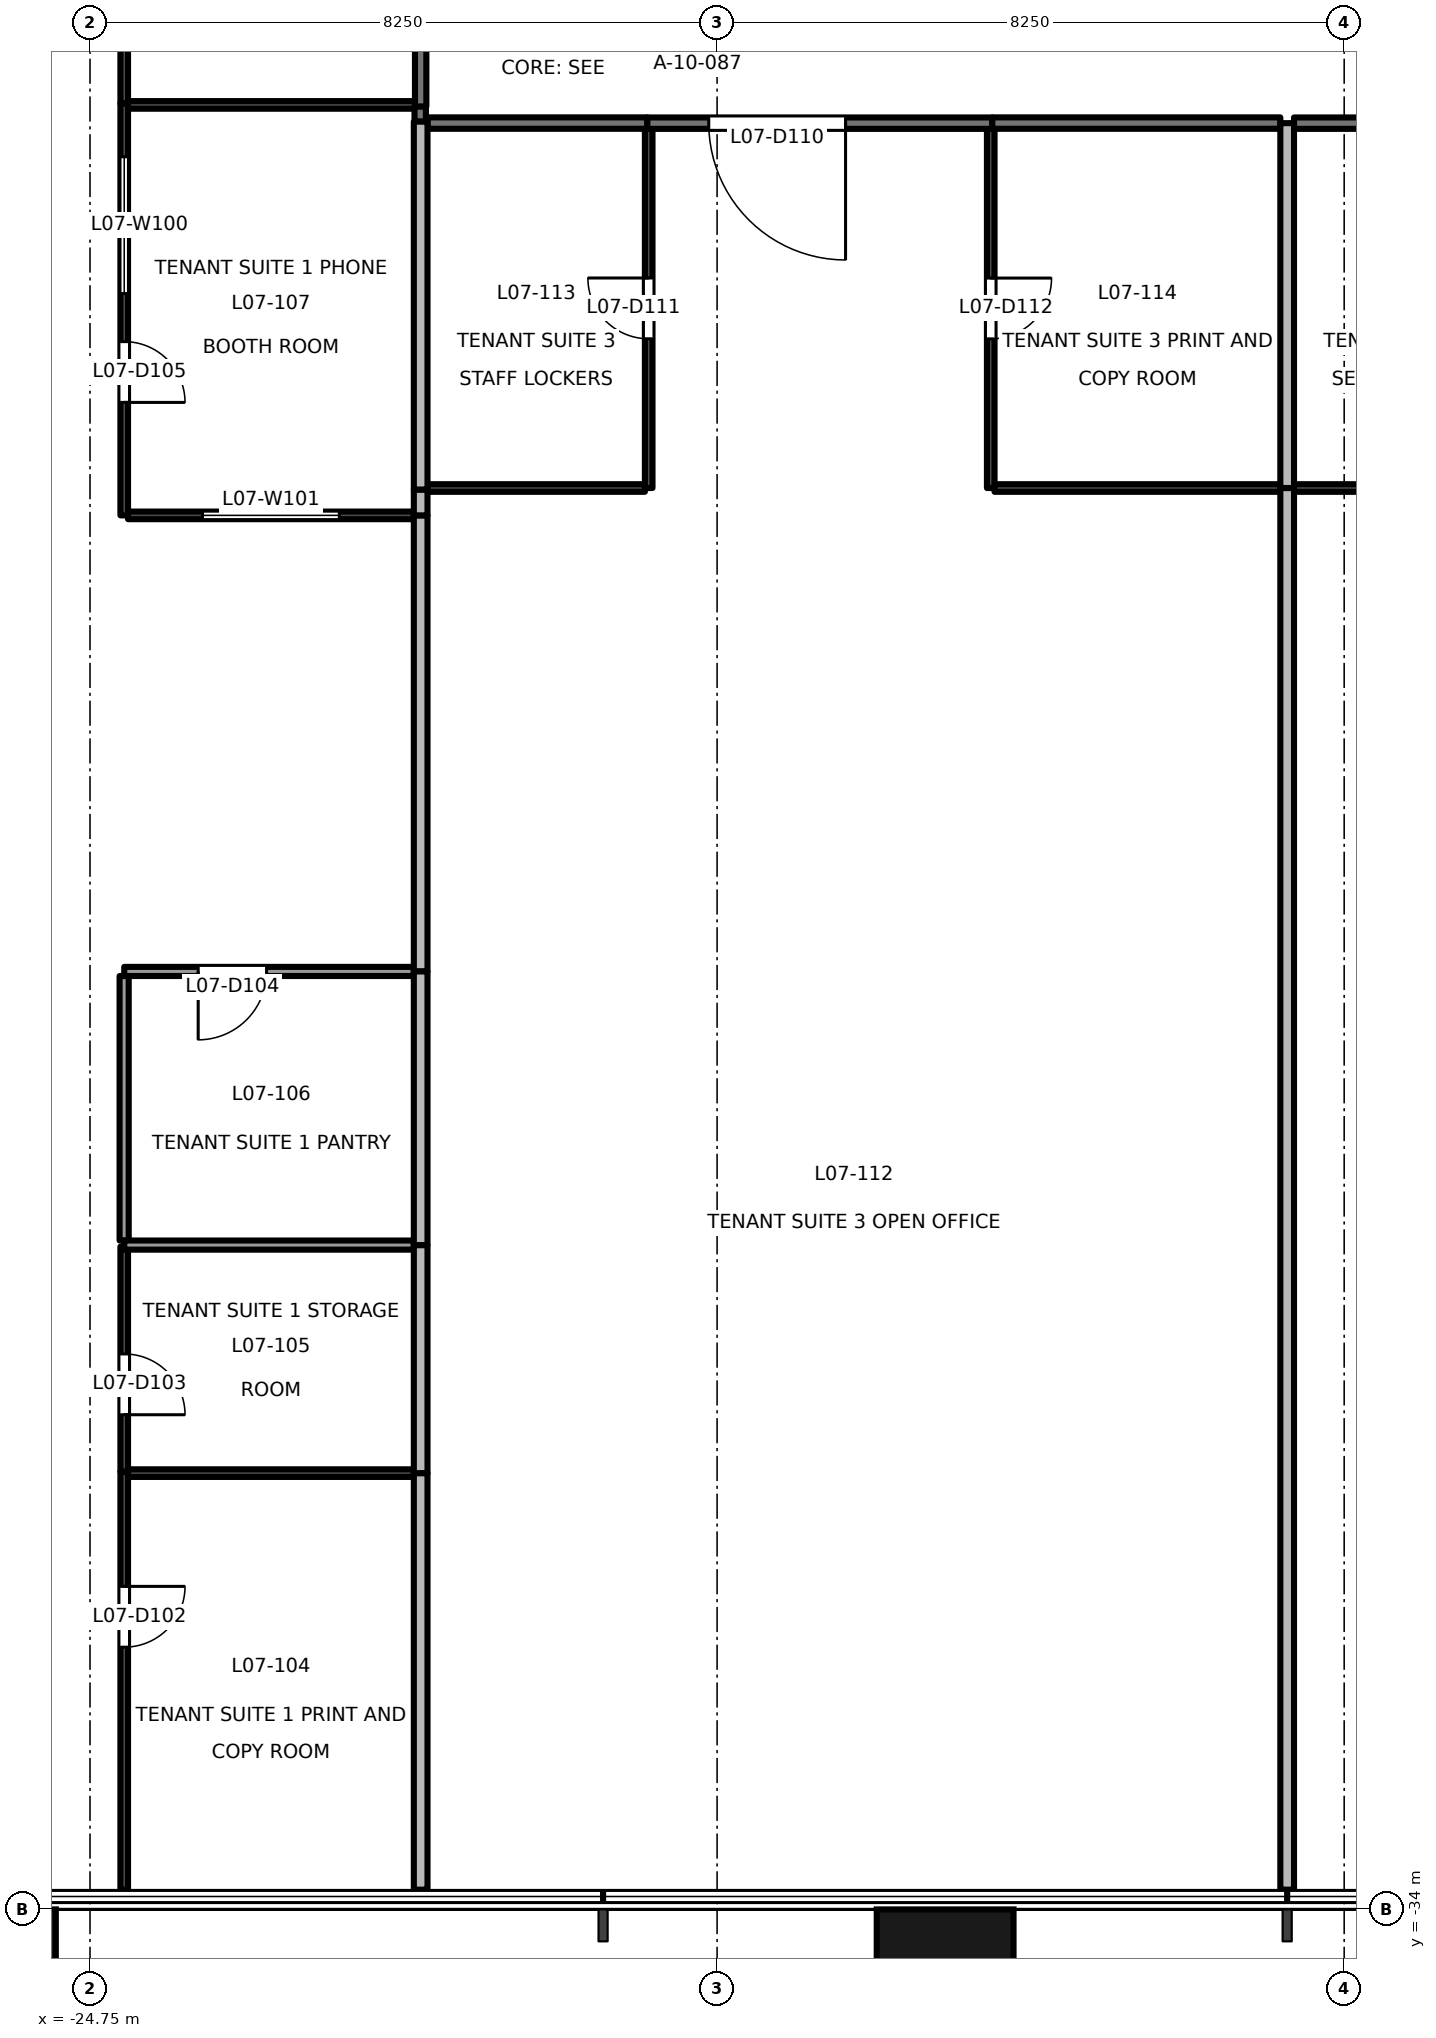
"""IFC4 building model, lengths in metres.
Left out: names, types, materials, properties, quantities, classifications, styles, units other than length and angle.
Written with IfcOpenShell. Run it as: python <this file> out.ifc"""

import sys

from ifc_helpers import new_model, si_unit, direction, frame, frame_2d, origin, origin_2d, place, context, subcontext, project, spatial, rectangle, extrude, element, fill, save


model = new_model("IFC4")
c1 = context("Model", 3, precision=1e-05, world=origin(), true_north=direction((0.0, 1.0)))
c2 = subcontext(c1, "Body", "Model", "MODEL_VIEW")
j1 = project(units=[si_unit("LENGTHUNIT", "METRE"), si_unit("PLANEANGLEUNIT", "RADIAN")], contexts=[c1])
p1 = place(None, origin())
s1 = spatial("IfcSite", under=j1, at=p1, CompositionType="ELEMENT")
p2 = place(p1, origin())
s2 = spatial("IfcBuilding", under=s1, at=p2, CompositionType="ELEMENT")
p3 = place(p2, frame((0.0, 0.0, 36.5)))
s3 = spatial("IfcBuildingStorey", under=s2, at=p3, CompositionType="ELEMENT", Elevation=36.5)
for number, where, z_axis, x_axis in (
    (1, (-26.1, -34.9, -0.2), (0.0, 0.0, 1.0), (1.0, 0.0, 0.0)),
    (2, (-13.5, -34.9, -0.2), (0.0, 0.0, 1.0), (1.0, 0.0, 0.0)),
):
    element("IfcColumn", number, at=place(p3, frame(where, z_axis=z_axis, x_axis=x_axis)), inside=s3, PredefinedType="COLUMN", context=c2, shape_type="SweptSolid", body=[
        extrude(rectangle(XDim=1.8, YDim=1.8, at=origin_2d()), origin(), (0.0, 0.0, 1.0), 4.1),
    ])
p4 = place(p3, frame((-20.406, -10.48, 0.0), z_axis=(0.0, 0.0, 1.0), x_axis=(0.0, 1.0, 0.0)))
e3 = element("IfcWall", 3, at=p4, inside=s3, PredefinedType="PARTITIONING", context=c2, shape_type="SweptSolid", body=[
    extrude(rectangle(XDim=0.2, YDim=0.15, at=frame_2d((0.1, 0.0))), origin(), (0.0, 0.0, 1.0), 3.9),
])
p5 = place(p3, frame((-20.4, -10.28, 0.0), z_axis=(0.0, 0.0, 1.0), x_axis=(0.0, 1.0, 0.0)))
e4 = element("IfcWall", 4, at=p5, inside=s3, PredefinedType="PARTITIONING", context=c2, shape_type="SweptSolid", body=[
    extrude(rectangle(XDim=4.2, YDim=0.15, at=frame_2d((2.1, 0.0))), origin(), (0.0, 0.0, 1.0), 3.3),
])
p6 = place(p3, frame((-12.88, -10.5, 0.0), z_axis=(0.0, 0.0, 1.0), x_axis=(-1.0, 0.0, 0.0)))
e5 = element("IfcWall", 5, at=p6, inside=s3, PredefinedType="PARTITIONING", context=c2, shape_type="SweptSolid", body=[
    extrude(rectangle(XDim=4.54, YDim=0.15, at=frame_2d((2.27, 0.0))), origin(), (0.0, 0.0, 1.0), 2.9),
])
p7 = place(p6, frame((1.93, 0.0, 0.0)))
e6 = element("IfcOpeningElement", 6, at=p7, cuts=e5, PredefinedType="OPENING", context=c2, shape_type="SweptSolid", body=[
    extrude(rectangle(XDim=1.8, YDim=2.1, at=frame_2d((0.9, 1.05))), frame((0.0, 0.085, 0.0), z_axis=(0.0, -1.0, 0.0), x_axis=(1.0, 0.0, 0.0)), (0.0, 0.0, 1.0), 0.171),
])
p8 = place(p3, frame((-17.42, -10.499, 0.0), z_axis=(0.0, 0.0, 1.0), x_axis=(-1.0, 0.0, 0.0)))
e7 = element("IfcWall", 7, at=p8, inside=s3, PredefinedType="PARTITIONING", context=c2, shape_type="SweptSolid", body=[
    extrude(rectangle(XDim=2.89, YDim=0.15, at=frame_2d((1.445, 0.0))), origin(), (0.0, 0.0, 1.0), 2.5),
])
p9 = place(p3, frame((-9.09, -10.499, 0.0), z_axis=(0.0, 0.0, 1.0), x_axis=(-1.0, 0.0, 0.0)))
e8 = element("IfcWall", 8, at=p9, inside=s3, PredefinedType="PARTITIONING", context=c2, shape_type="SweptSolid", body=[
    extrude(rectangle(XDim=3.79, YDim=0.15, at=frame_2d((1.895, 0.0))), origin(), (0.0, 0.0, 1.0), 2.9),
])
p10 = place(p3, frame((-6.02, -10.5, 0.0), z_axis=(0.0, 0.0, 1.0), x_axis=(-1.0, 0.0, 0.0)))
e9 = element("IfcWall", 9, at=p10, inside=s3, PredefinedType="PARTITIONING", context=c2, shape_type="SweptSolid", body=[
    extrude(rectangle(XDim=2.89, YDim=0.15, at=frame_2d((1.445, 0.0))), origin(), (0.0, 0.0, 1.0), 2.9),
])
p11 = place(p3, frame((-24.3, -28.24, 0.0), z_axis=(0.0, 0.0, 1.0), x_axis=(0.0, -1.0, 0.0)))
e10 = element("IfcWall", 10, at=p11, inside=s3, PredefinedType="PARTITIONING", context=c2, shape_type="SweptSolid", body=[
    extrude(rectangle(XDim=5.5, YDim=0.1, at=frame_2d((2.75, 0.0))), origin(), (0.0, 0.0, 1.0), 3.9),
])
p12 = place(p11, frame((1.51, 0.0, 0.0)))
e11 = element("IfcOpeningElement", 11, at=p12, cuts=e10, PredefinedType="OPENING", context=c2, shape_type="SweptSolid", body=[
    extrude(rectangle(XDim=0.8, YDim=2.1, at=frame_2d((0.4, 1.05))), frame((0.0, 0.061, 0.0), z_axis=(0.0, -1.0, 0.0), x_axis=(1.0, 0.0, 0.0)), (0.0, 0.0, 1.0), 0.121),
])
p13 = place(p3, frame((-24.3, -25.28, 0.0), z_axis=(0.0, 0.0, 1.0), x_axis=(0.0, -1.0, 0.0)))
e12 = element("IfcWall", 12, at=p13, inside=s3, PredefinedType="PARTITIONING", context=c2, shape_type="SweptSolid", body=[
    extrude(rectangle(XDim=2.96, YDim=0.1, at=frame_2d((1.48, 0.0))), origin(), (0.0, 0.0, 1.0), 3.3),
])
p14 = place(p13, frame((1.412, 0.0, 0.0)))
e13 = element("IfcOpeningElement", 13, at=p14, cuts=e12, PredefinedType="OPENING", context=c2, shape_type="SweptSolid", body=[
    extrude(rectangle(XDim=0.8, YDim=2.1, at=frame_2d((0.4, 1.05))), frame((0.0, 0.061, 0.0), z_axis=(0.0, -1.0, 0.0), x_axis=(1.0, 0.0, 0.0)), (0.0, 0.0, 1.0), 0.121),
])
p15 = place(p3, frame((-24.301, -21.72, 0.0), z_axis=(0.0, 0.0, 1.0), x_axis=(0.0, -1.0, 0.0)))
e14 = element("IfcWall", 14, at=p15, inside=s3, PredefinedType="PARTITIONING", context=c2, shape_type="SweptSolid", body=[
    extrude(rectangle(XDim=3.48, YDim=0.12, at=frame_2d((1.74, 0.0))), origin(), (0.0, 0.0, 1.0), 3.3),
])
p16 = place(p3, frame((-20.49, -21.66, 0.0), z_axis=(0.0, 0.0, 1.0), x_axis=(-1.0, 0.0, 0.0)))
e15 = element("IfcWall", 15, at=p16, inside=s3, PredefinedType="PARTITIONING", context=c2, shape_type="SweptSolid", body=[
    extrude(rectangle(XDim=3.81, YDim=0.12, at=frame_2d((1.905, 0.0))), origin(), (0.0, 0.0, 1.0), 3.9),
])
p17 = place(p16, frame((1.937, 0.0, 0.0)))
e16 = element("IfcOpeningElement", 16, at=p17, cuts=e15, PredefinedType="OPENING", context=c2, shape_type="SweptSolid", body=[
    extrude(rectangle(XDim=0.9, YDim=2.1, at=frame_2d((0.45, 1.05))), frame((0.0, 0.071, 0.0), z_axis=(0.0, -1.0, 0.0), x_axis=(1.0, 0.0, 0.0)), (0.0, 0.0, 1.0), 0.141),
])
p18 = place(p3, frame((-24.3, -10.24, 0.0), z_axis=(0.0, 0.0, 1.0), x_axis=(0.0, -1.0, 0.0)))
e17 = element("IfcWall", 17, at=p18, inside=s3, PredefinedType="PARTITIONING", context=c2, shape_type="SweptSolid", body=[
    extrude(rectangle(XDim=5.42, YDim=0.1, at=frame_2d((2.71, 0.0))), origin(), (0.0, 0.0, 1.0), 3.3),
])
p19 = place(p18, frame((3.134, 0.0, 0.0)))
e18 = element("IfcOpeningElement", 18, at=p19, cuts=e17, PredefinedType="OPENING", context=c2, shape_type="SweptSolid", body=[
    extrude(rectangle(XDim=0.8, YDim=2.1, at=frame_2d((0.4, 1.05))), frame((0.0, 0.061, 0.0), z_axis=(0.0, -1.0, 0.0), x_axis=(1.0, 0.0, 0.0)), (0.0, 0.0, 1.0), 0.121),
])
p20 = place(p18, frame((0.702, 0.0, 0.9)))
e19 = element("IfcOpeningElement", 19, at=p20, cuts=e17, PredefinedType="OPENING", context=c2, shape_type="SweptSolid", body=[
    extrude(rectangle(XDim=1.8, YDim=1.2, at=frame_2d((0.9, 0.6))), frame((0.0, 0.061, 0.0), z_axis=(0.0, -1.0, 0.0), x_axis=(1.0, 0.0, 0.0)), (0.0, 0.0, 1.0), 0.121),
])
p21 = place(p3, frame((-24.25, -15.66, 0.0), z_axis=(0.0, 0.0, 1.0), x_axis=(1.0, 0.0, 0.0)))
e20 = element("IfcWall", 20, at=p21, inside=s3, PredefinedType="PARTITIONING", context=c2, shape_type="SweptSolid", body=[
    extrude(rectangle(XDim=3.76, YDim=0.1, at=frame_2d((1.88, 0.0))), origin(), (0.0, 0.0, 1.0), 3.9),
])
p22 = place(p21, frame((0.98, 0.0, 0.9)))
e21 = element("IfcOpeningElement", 21, at=p22, cuts=e20, PredefinedType="OPENING", context=c2, shape_type="SweptSolid", body=[
    extrude(rectangle(XDim=1.8, YDim=1.2, at=frame_2d((0.9, 0.6))), frame((0.0, 0.061, 0.0), z_axis=(0.0, -1.0, 0.0), x_axis=(1.0, 0.0, 0.0)), (0.0, 0.0, 1.0), 0.121),
])
p23 = place(p3, frame((-24.3, -6.06, 0.0), z_axis=(0.0, 0.0, 1.0), x_axis=(0.0, -1.0, 0.0)))
e22 = element("IfcWall", 22, at=p23, inside=s3, PredefinedType="PARTITIONING", context=c2, shape_type="SweptSolid", body=[
    extrude(rectangle(XDim=4.18, YDim=0.1, at=frame_2d((2.09, 0.0))), origin(), (0.0, 0.0, 1.0), 3.3),
])
p24 = place(p23, frame((1.084, 0.0, 0.0)))
e23 = element("IfcOpeningElement", 23, at=p24, cuts=e22, PredefinedType="OPENING", context=c2, shape_type="SweptSolid", body=[
    extrude(rectangle(XDim=0.9, YDim=2.1, at=frame_2d((0.45, 1.05))), frame((0.0, 0.061, 0.0), z_axis=(0.0, -1.0, 0.0), x_axis=(1.0, 0.0, 0.0)), (0.0, 0.0, 1.0), 0.121),
])
p25 = place(p3, frame((-20.4, -15.66, 0.0), z_axis=(0.0, 0.0, 1.0), x_axis=(0.0, -1.0, 0.0)))
e24 = element("IfcWall", 24, at=p25, inside=s3, PredefinedType="PARTITIONING", context=c2, shape_type="SweptSolid", body=[
    extrude(rectangle(XDim=6.0, YDim=0.18, at=frame_2d((3.0, 0.0))), origin(), (0.0, 0.0, 1.0), 3.3),
])
p26 = place(p3, frame((-24.25, -28.26, 0.0), z_axis=(0.0, 0.0, 1.0), x_axis=(1.0, 0.0, 0.0)))
e25 = element("IfcWall", 25, at=p26, inside=s3, PredefinedType="PARTITIONING", context=c2, shape_type="SweptSolid", body=[
    extrude(rectangle(XDim=3.76, YDim=0.1, at=frame_2d((1.88, 0.0))), origin(), (0.0, 0.0, 1.0), 3.9),
])
p27 = place(p3, frame((-20.4, -28.26, 0.0), z_axis=(0.0, 0.0, 1.0), x_axis=(0.0, -1.0, 0.0)))
e26 = element("IfcWall", 26, at=p27, inside=s3, PredefinedType="PARTITIONING", context=c2, shape_type="SweptSolid", body=[
    extrude(rectangle(XDim=5.48, YDim=0.18, at=frame_2d((2.74, 0.0))), origin(), (0.0, 0.0, 1.0), 3.9),
])
p28 = place(p3, frame((-24.3, -25.26, 0.0), z_axis=(0.0, 0.0, 1.0), x_axis=(1.0, 0.0, 0.0)))
e27 = element("IfcWall", 27, at=p28, inside=s3, PredefinedType="PARTITIONING", context=c2, shape_type="SweptSolid", body=[
    extrude(rectangle(XDim=3.81, YDim=0.12, at=frame_2d((1.905, 0.0))), origin(), (0.0, 0.0, 1.0), 3.9),
])
p29 = place(p3, frame((-20.4, -25.26, 0.0), z_axis=(0.0, 0.0, 1.0), x_axis=(0.0, -1.0, 0.0)))
e28 = element("IfcWall", 28, at=p29, inside=s3, PredefinedType="PARTITIONING", context=c2, shape_type="SweptSolid", body=[
    extrude(rectangle(XDim=3.0, YDim=0.18, at=frame_2d((1.5, 0.0))), origin(), (0.0, 0.0, 1.0), 3.3),
])
p30 = place(p3, frame((-20.4, -21.66, 0.0), z_axis=(0.0, 0.0, 1.0), x_axis=(0.0, -1.0, 0.0)))
e29 = element("IfcWall", 29, at=p30, inside=s3, PredefinedType="PARTITIONING", context=c2, shape_type="SweptSolid", body=[
    extrude(rectangle(XDim=3.6, YDim=0.18, at=frame_2d((1.8, 0.0))), origin(), (0.0, 0.0, 1.0), 3.3),
])
p31 = place(p3, frame((-24.25, -10.26, 0.0), z_axis=(0.0, 0.0, 1.0), x_axis=(1.0, 0.0, 0.0)))
e30 = element("IfcWall", 30, at=p31, inside=s3, PredefinedType="PARTITIONING", context=c2, shape_type="SweptSolid", body=[
    extrude(rectangle(XDim=3.775, YDim=0.1, at=frame_2d((1.887, 0.0))), origin(), (0.0, 0.0, 1.0), 3.9),
])
p32 = place(p3, frame((-20.4, -15.32, 0.0), z_axis=(0.0, 0.0, 1.0), x_axis=(0.0, -1.0, 0.0)))
e31 = element("IfcWall", 31, at=p32, inside=s3, PredefinedType="PARTITIONING", context=c2, shape_type="SweptSolid", body=[
    extrude(rectangle(XDim=0.34, YDim=0.18, at=frame_2d((0.17, 0.0))), origin(), (0.0, 0.0, 1.0), 3.9),
])
p33 = place(p3, frame((-20.4, -10.48, 0.0), z_axis=(0.0, 0.0, 1.0), x_axis=(0.0, -1.0, 0.0)))
e32 = element("IfcWall", 32, at=p33, inside=s3, PredefinedType="PARTITIONING", context=c2, shape_type="SweptSolid", body=[
    extrude(rectangle(XDim=4.84, YDim=0.18, at=frame_2d((2.42, 0.0))), origin(), (0.0, 0.0, 1.0), 3.3),
])
p34 = place(p3, frame((-20.31, -15.3, 0.0), z_axis=(0.0, 0.0, 1.0), x_axis=(1.0, 0.0, 0.0)))
e33 = element("IfcWall", 33, at=p34, inside=s3, PredefinedType="PARTITIONING", context=c2, shape_type="SweptSolid", body=[
    extrude(rectangle(XDim=2.86, YDim=0.1, at=frame_2d((1.43, 0.0))), origin(), (0.0, 0.0, 1.0), 2.5),
])
p35 = place(p3, frame((-17.4, -15.3, 0.0), z_axis=(0.0, 0.0, 1.0), x_axis=(0.0, 1.0, 0.0)))
e34 = element("IfcWall", 34, at=p35, inside=s3, PredefinedType="PARTITIONING", context=c2, shape_type="SweptSolid", body=[
    extrude(rectangle(XDim=4.725, YDim=0.1, at=frame_2d((2.363, 0.0))), origin(), (0.0, 0.0, 1.0), 3.9),
])
p36 = place(p35, frame((1.963, 0.0, 0.0)))
e35 = element("IfcOpeningElement", 35, at=p36, cuts=e34, PredefinedType="OPENING", context=c2, shape_type="SweptSolid", body=[
    extrude(rectangle(XDim=0.8, YDim=2.1, at=frame_2d((0.4, 1.05))), frame((0.0, 0.061, 0.0), z_axis=(0.0, -1.0, 0.0), x_axis=(1.0, 0.0, 0.0)), (0.0, 0.0, 1.0), 0.121),
])
p37 = place(p3, frame((-12.9, -10.575, 0.0), z_axis=(0.0, 0.0, 1.0), x_axis=(0.0, -1.0, 0.0)))
e36 = element("IfcWall", 36, at=p37, inside=s3, PredefinedType="PARTITIONING", context=c2, shape_type="SweptSolid", body=[
    extrude(rectangle(XDim=4.725, YDim=0.1, at=frame_2d((2.363, 0.0))), origin(), (0.0, 0.0, 1.0), 3.9),
])
p38 = place(p37, frame((1.963, 0.0, 0.0)))
e37 = element("IfcOpeningElement", 37, at=p38, cuts=e36, PredefinedType="OPENING", context=c2, shape_type="SweptSolid", body=[
    extrude(rectangle(XDim=0.8, YDim=2.1, at=frame_2d((0.4, 1.05))), frame((0.0, 0.061, 0.0), z_axis=(0.0, -1.0, 0.0), x_axis=(1.0, 0.0, 0.0)), (0.0, 0.0, 1.0), 0.121),
])
p39 = place(p3, frame((-12.85, -15.3, 0.0), z_axis=(0.0, 0.0, 1.0), x_axis=(1.0, 0.0, 0.0)))
e38 = element("IfcWall", 38, at=p39, inside=s3, PredefinedType="PARTITIONING", context=c2, shape_type="SweptSolid", body=[
    extrude(rectangle(XDim=3.76, YDim=0.1, at=frame_2d((1.88, 0.0))), origin(), (0.0, 0.0, 1.0), 2.9),
])
p40 = place(p3, frame((-9.0, -15.3, 0.0), z_axis=(0.0, 0.0, 1.0), x_axis=(0.0, -1.0, 0.0)))
e39 = element("IfcWall", 39, at=p40, inside=s3, PredefinedType="PARTITIONING", context=c2, shape_type="SweptSolid", body=[
    extrude(rectangle(XDim=18.44, YDim=0.18, at=frame_2d((9.22, 0.0))), origin(), (0.0, 0.0, 1.0), 2.9),
])
p41 = place(p3, frame((-9.0, -10.5, 0.0), z_axis=(0.0, 0.0, 1.0), x_axis=(0.0, -1.0, 0.0)))
e40 = element("IfcWall", 40, at=p41, inside=s3, PredefinedType="PARTITIONING", context=c2, shape_type="SweptSolid", body=[
    extrude(rectangle(XDim=4.8, YDim=0.18, at=frame_2d((2.4, 0.0))), origin(), (0.0, 0.0, 1.0), 2.9),
])
p42 = place(p3, frame((-8.91, -15.3, 0.0), z_axis=(0.0, 0.0, 1.0), x_axis=(1.0, 0.0, 0.0)))
e41 = element("IfcWall", 41, at=p42, inside=s3, PredefinedType="PARTITIONING", context=c2, shape_type="SweptSolid", body=[
    extrude(rectangle(XDim=2.86, YDim=0.1, at=frame_2d((1.43, 0.0))), origin(), (0.0, 0.0, 1.0), 2.9),
])
p43 = place(p12, origin())
e42 = element("IfcDoor", 42, at=p43, inside=s3, OperationType="SINGLE_SWING_LEFT", PredefinedType="DOOR", context=c2, shape_type="SweptSolid", body=[
    extrude(rectangle(XDim=0.8, YDim=2.1, at=frame_2d((0.4, 1.05))), frame((0.0, 0.025, 0.0), z_axis=(0.0, -1.0, 0.0), x_axis=(1.0, 0.0, 0.0)), (0.0, 0.0, 1.0), 0.05),
])
fill(e11, e42)
p44 = place(p14, origin())
e43 = element("IfcDoor", 43, at=p44, inside=s3, OperationType="SINGLE_SWING_RIGHT", PredefinedType="DOOR", context=c2, shape_type="SweptSolid", body=[
    extrude(rectangle(XDim=0.8, YDim=2.1, at=frame_2d((0.4, 1.05))), frame((0.0, 0.025, 0.0), z_axis=(0.0, -1.0, 0.0), x_axis=(1.0, 0.0, 0.0)), (0.0, 0.0, 1.0), 0.05),
])
fill(e13, e43)
p45 = place(p17, origin())
e44 = element("IfcDoor", 44, at=p45, inside=s3, OperationType="SINGLE_SWING_RIGHT", PredefinedType="DOOR", context=c2, shape_type="SweptSolid", body=[
    extrude(rectangle(XDim=0.9, YDim=2.1, at=frame_2d((0.45, 1.05))), frame((0.0, 0.025, 0.0), z_axis=(0.0, -1.0, 0.0), x_axis=(1.0, 0.0, 0.0)), (0.0, 0.0, 1.0), 0.05),
])
fill(e16, e44)
p46 = place(p19, origin())
e45 = element("IfcDoor", 45, at=p46, inside=s3, OperationType="SINGLE_SWING_RIGHT", PredefinedType="DOOR", context=c2, shape_type="SweptSolid", body=[
    extrude(rectangle(XDim=0.8, YDim=2.1, at=frame_2d((0.4, 1.05))), frame((0.0, 0.025, 0.0), z_axis=(0.0, -1.0, 0.0), x_axis=(1.0, 0.0, 0.0)), (0.0, 0.0, 1.0), 0.05),
])
fill(e18, e45)
p47 = place(p7, origin())
e46 = element("IfcDoor", 46, at=p47, inside=s3, OperationType="DOUBLE_DOOR_SINGLE_SWING", PredefinedType="DOOR", context=c2, shape_type="SweptSolid", body=[
    extrude(rectangle(XDim=1.8, YDim=2.1, at=frame_2d((0.9, 1.05))), frame((0.0, 0.025, 0.0), z_axis=(0.0, -1.0, 0.0), x_axis=(1.0, 0.0, 0.0)), (0.0, 0.0, 1.0), 0.05),
])
fill(e6, e46)
p48 = place(p36, origin())
e47 = element("IfcDoor", 47, at=p48, inside=s3, OperationType="SINGLE_SWING_RIGHT", PredefinedType="DOOR", context=c2, shape_type="SweptSolid", body=[
    extrude(rectangle(XDim=0.8, YDim=2.1, at=frame_2d((0.4, 1.05))), frame((0.0, 0.025, 0.0), z_axis=(0.0, -1.0, 0.0), x_axis=(1.0, 0.0, 0.0)), (0.0, 0.0, 1.0), 0.05),
])
fill(e35, e47)
p49 = place(p38, origin())
e48 = element("IfcDoor", 48, at=p49, inside=s3, OperationType="SINGLE_SWING_LEFT", PredefinedType="DOOR", context=c2, shape_type="SweptSolid", body=[
    extrude(rectangle(XDim=0.8, YDim=2.1, at=frame_2d((0.4, 1.05))), frame((0.0, 0.025, 0.0), z_axis=(0.0, -1.0, 0.0), x_axis=(1.0, 0.0, 0.0)), (0.0, 0.0, 1.0), 0.05),
])
fill(e37, e48)
p50 = place(p20, origin())
e49 = element("IfcWindow", 49, at=p50, inside=s3, PartitioningType="SINGLE_PANEL", PredefinedType="WINDOW", context=c2, shape_type="SweptSolid", body=[
    extrude(rectangle(XDim=1.8, YDim=1.2, at=frame_2d((0.9, 0.6))), frame((0.0, 0.03, 0.0), z_axis=(0.0, -1.0, 0.0), x_axis=(1.0, 0.0, 0.0)), (0.0, 0.0, 1.0), 0.06),
])
fill(e19, e49)
p51 = place(p22, origin())
e50 = element("IfcWindow", 50, at=p51, inside=s3, PartitioningType="SINGLE_PANEL", PredefinedType="WINDOW", context=c2, shape_type="SweptSolid", body=[
    extrude(rectangle(XDim=1.8, YDim=1.2, at=frame_2d((0.9, 0.6))), frame((0.0, 0.03, 0.0), z_axis=(0.0, -1.0, 0.0), x_axis=(1.0, 0.0, 0.0)), (0.0, 0.0, 1.0), 0.06),
])
fill(e21, e50)
save(model, sys.argv[1])
